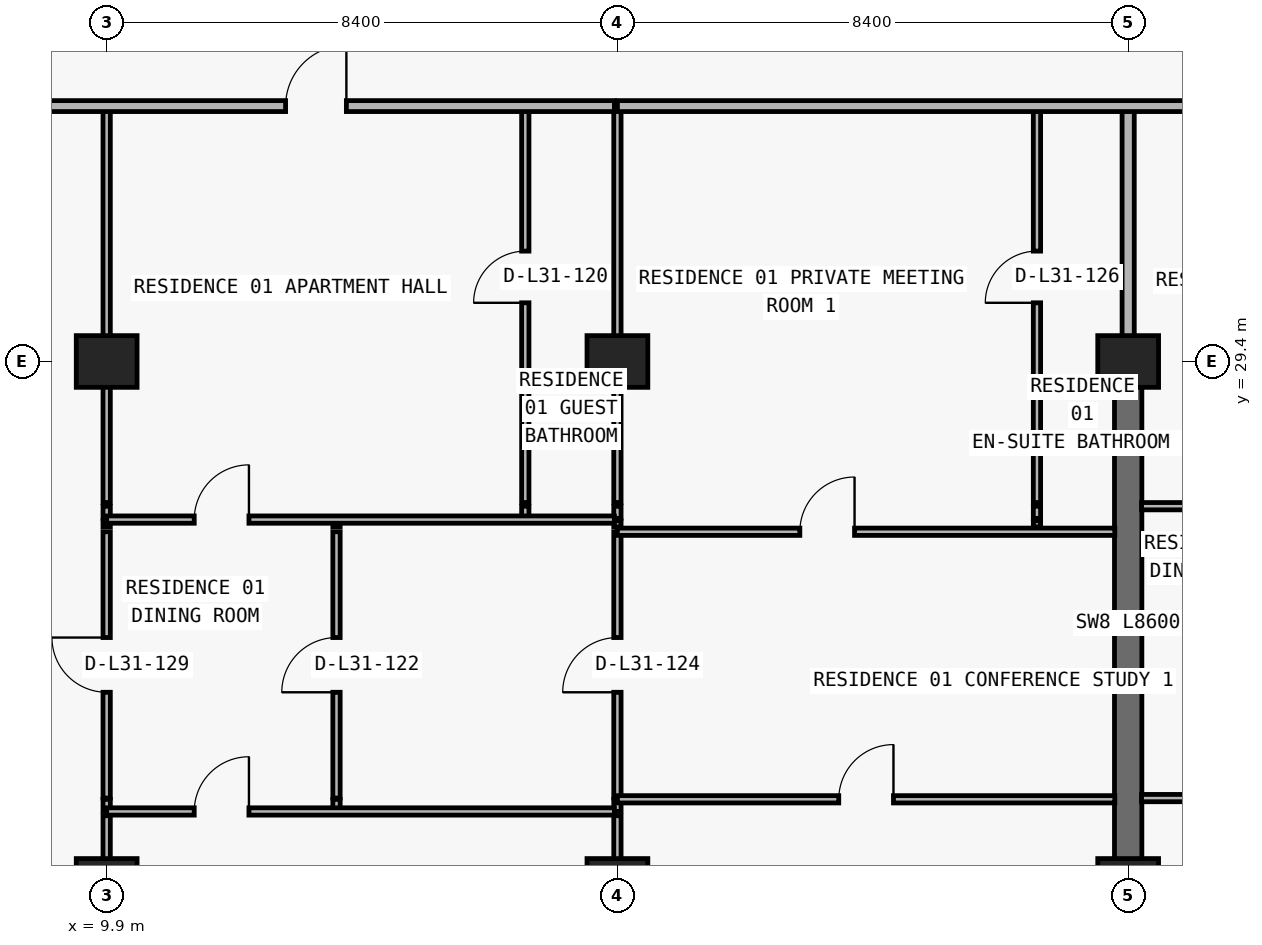
"""IFC4 building model, lengths in metres.
Left out: names, types, materials, properties, quantities, classifications, styles, units other than length and angle.
Written with IfcOpenShell. Run it as: python <this file> out.ifc"""

import sys

from ifc_helpers import new_model, si_unit, direction, frame, frame_2d, origin, origin_2d, place, context, subcontext, project, spatial, rectangle, extrude, element, fill, save


model = new_model("IFC4")
c1 = context("Model", 3, precision=1e-05, world=origin(), true_north=direction((0.0, 1.0)))
c2 = subcontext(c1, "Body", "Model", "MODEL_VIEW")
j1 = project(units=[si_unit("LENGTHUNIT", "METRE"), si_unit("PLANEANGLEUNIT", "RADIAN")], contexts=[c1])
p1 = place(None, origin())
s1 = spatial("IfcSite", under=j1, at=p1, CompositionType="ELEMENT")
p2 = place(p1, origin())
s2 = spatial("IfcBuilding", under=s1, at=p2, CompositionType="ELEMENT")
p3 = place(p2, frame((0.0, 0.0, 115.8)))
s3 = spatial("IfcBuildingStorey", under=s2, at=p3, CompositionType="ELEMENT", Elevation=115.8)
for number, where, z_axis, x_axis in (
    (1, (9.9, 20.8, 0.0), (0.0, 0.0, 1.0), (1.0, 0.0, 0.0)),
    (2, (18.3, 20.8, 0.0), (0.0, 0.0, 1.0), (1.0, 0.0, 0.0)),
    (3, (26.7, 20.8, 0.0), (0.0, 0.0, 1.0), (1.0, 0.0, 0.0)),
    (4, (9.9, 29.4, 0.0), (0.0, 0.0, 1.0), (1.0, 0.0, 0.0)),
    (5, (18.3, 29.4, 0.0), (0.0, 0.0, 1.0), (1.0, 0.0, 0.0)),
    (6, (26.7, 29.4, 0.0), (0.0, 0.0, 1.0), (1.0, 0.0, 0.0)),
):
    element("IfcColumn", number, at=place(p3, frame(where, z_axis=z_axis, x_axis=x_axis)), inside=s3, PredefinedType="COLUMN", context=c2, shape_type="SweptSolid", body=[
        extrude(rectangle(XDim=1.0, YDim=0.85, at=origin_2d()), origin(), (0.0, 0.0, 1.0), 3.05),
    ])
p4 = place(p3, frame((26.7, 20.8, 0.0), z_axis=(0.0, 0.0, 1.0), x_axis=(0.0, 1.0, 0.0)))
e7 = element("IfcWall", 7, at=p4, inside=s3, PredefinedType="SHEAR", context=c2, shape_type="SweptSolid", body=[
    extrude(rectangle(XDim=8.6, YDim=0.45, at=frame_2d((4.3, 0.0))), origin(), (0.0, 0.0, 1.0), 3.05),
])
p5 = place(p3, frame((9.9, 8.84, 0.0), z_axis=(0.0, 0.0, 1.0), x_axis=(0.0, 1.0, 0.0)))
e8 = element("IfcWall", 8, at=p5, inside=s3, PredefinedType="PARTITIONING", context=c2, shape_type="SweptSolid", body=[
    extrude(rectangle(XDim=13.09, YDim=0.12, at=frame_2d((6.545, 0.0))), origin(), (0.0, 0.0, 1.0), 2.174),
])
p6 = place(p3, frame((9.9, 22.0, 0.0), z_axis=(0.0, 0.0, 1.0), x_axis=(0.0, 1.0, 0.0)))
e9 = element("IfcWall", 9, at=p6, inside=s3, PredefinedType="PARTITIONING", context=c2, shape_type="SweptSolid", body=[
    extrude(rectangle(XDim=0.2, YDim=0.12, at=frame_2d((0.1, 0.0))), origin(), (0.0, 0.0, 1.0), 2.174),
])
p7 = place(p3, frame((9.9, 22.22, 0.0), z_axis=(0.0, 0.0, 1.0), x_axis=(0.0, 1.0, 0.0)))
e10 = element("IfcWall", 10, at=p7, inside=s3, PredefinedType="PARTITIONING", context=c2, shape_type="SweptSolid", body=[
    extrude(rectangle(XDim=4.38, YDim=0.12, at=frame_2d((2.19, 0.0))), origin(), (0.0, 0.0, 1.0), 2.174),
])
p8 = place(p7, frame((1.74, 0.0, 0.0)))
e11 = element("IfcOpeningElement", 11, at=p8, cuts=e10, PredefinedType="OPENING", context=c2, shape_type="SweptSolid", body=[
    extrude(rectangle(XDim=0.9, YDim=2.124, at=frame_2d((0.45, 1.062))), frame((0.0, 0.07, 0.0), z_axis=(0.0, -1.0, 0.0), x_axis=(1.0, 0.0, 0.0)), (0.0, 0.0, 1.0), 0.14),
])
p9 = place(p3, frame((9.9, 26.68, 0.0), z_axis=(0.0, 0.0, 1.0), x_axis=(0.0, 1.0, 0.0)))
e12 = element("IfcWall", 12, at=p9, inside=s3, PredefinedType="PARTITIONING", context=c2, shape_type="SweptSolid", body=[
    extrude(rectangle(XDim=0.1, YDim=0.12, at=frame_2d((0.05, 0.0))), origin(), (0.0, 0.0, 1.0), 2.174),
])
p10 = place(p3, frame((9.9, 26.82, 0.0), z_axis=(0.0, 0.0, 1.0), x_axis=(0.0, 1.0, 0.0)))
e13 = element("IfcWall", 13, at=p10, inside=s3, PredefinedType="PARTITIONING", context=c2, shape_type="SweptSolid", body=[
    extrude(rectangle(XDim=0.2, YDim=0.12, at=frame_2d((0.1, 0.0))), origin(), (0.0, 0.0, 1.0), 2.174),
])
p11 = place(p3, frame((9.9, 27.08, 0.0), z_axis=(0.0, 0.0, 1.0), x_axis=(0.0, 1.0, 0.0)))
e14 = element("IfcWall", 14, at=p11, inside=s3, PredefinedType="PARTITIONING", context=c2, shape_type="SweptSolid", body=[
    extrude(rectangle(XDim=6.52, YDim=0.12, at=frame_2d((3.26, 0.0))), origin(), (0.0, 0.0, 1.0), 2.174),
])
p12 = place(p3, frame((13.68, 22.0, 0.0), z_axis=(0.0, 0.0, 1.0), x_axis=(0.0, 1.0, 0.0)))
e15 = element("IfcWall", 15, at=p12, inside=s3, PredefinedType="PARTITIONING", context=c2, shape_type="SweptSolid", body=[
    extrude(rectangle(XDim=0.2, YDim=0.12, at=frame_2d((0.1, 0.0))), origin(), (0.0, 0.0, 1.0), 3.05),
])
p13 = place(p3, frame((13.68, 22.22, 0.0), z_axis=(0.0, 0.0, 1.0), x_axis=(0.0, 1.0, 0.0)))
e16 = element("IfcWall", 16, at=p13, inside=s3, PredefinedType="PARTITIONING", context=c2, shape_type="SweptSolid", body=[
    extrude(rectangle(XDim=4.38, YDim=0.12, at=frame_2d((2.19, 0.0))), origin(), (0.0, 0.0, 1.0), 3.05),
])
p14 = place(p13, frame((1.74, 0.0, 0.0)))
e17 = element("IfcOpeningElement", 17, at=p14, cuts=e16, PredefinedType="OPENING", context=c2, shape_type="SweptSolid", body=[
    extrude(rectangle(XDim=0.9, YDim=2.15, at=frame_2d((0.45, 1.075))), frame((0.0, 0.07, 0.0), z_axis=(0.0, -1.0, 0.0), x_axis=(1.0, 0.0, 0.0)), (0.0, 0.0, 1.0), 0.14),
])
p15 = place(p3, frame((13.68, 26.68, 0.0), z_axis=(0.0, 0.0, 1.0), x_axis=(0.0, 1.0, 0.0)))
e18 = element("IfcWall", 18, at=p15, inside=s3, PredefinedType="PARTITIONING", context=c2, shape_type="SweptSolid", body=[
    extrude(rectangle(XDim=0.1, YDim=0.12, at=frame_2d((0.05, 0.0))), origin(), (0.0, 0.0, 1.0), 3.05),
])
p16 = place(p3, frame((16.785, 26.82, 0.0), z_axis=(0.0, 0.0, 1.0), x_axis=(0.0, 1.0, 0.0)))
e19 = element("IfcWall", 19, at=p16, inside=s3, PredefinedType="PARTITIONING", context=c2, shape_type="SweptSolid", body=[
    extrude(rectangle(XDim=0.2, YDim=0.12, at=frame_2d((0.1, 0.0))), origin(), (0.0, 0.0, 1.0), 3.05),
])
p17 = place(p3, frame((16.785, 27.08, 0.0), z_axis=(0.0, 0.0, 1.0), x_axis=(0.0, 1.0, 0.0)))
e20 = element("IfcWall", 20, at=p17, inside=s3, PredefinedType="PARTITIONING", context=c2, shape_type="SweptSolid", body=[
    extrude(rectangle(XDim=6.52, YDim=0.12, at=frame_2d((3.26, 0.0))), origin(), (0.0, 0.0, 1.0), 3.05),
])
p18 = place(p17, frame((3.285, 0.0, 0.0)))
e21 = element("IfcOpeningElement", 21, at=p18, cuts=e20, PredefinedType="OPENING", context=c2, shape_type="SweptSolid", body=[
    extrude(rectangle(XDim=0.85, YDim=2.1, at=frame_2d((0.425, 1.05))), frame((0.0, 0.07, 0.0), z_axis=(0.0, -1.0, 0.0), x_axis=(1.0, 0.0, 0.0)), (0.0, 0.0, 1.0), 0.14),
])
p19 = place(p3, frame((18.3, 8.84, 0.0), z_axis=(0.0, 0.0, 1.0), x_axis=(0.0, 1.0, 0.0)))
e22 = element("IfcWall", 22, at=p19, inside=s3, PredefinedType="PARTITIONING", context=c2, shape_type="SweptSolid", body=[
    extrude(rectangle(XDim=13.09, YDim=0.12, at=frame_2d((6.545, 0.0))), origin(), (0.0, 0.0, 1.0), 2.174),
])
p20 = place(p3, frame((18.3, 22.0, 0.0), z_axis=(0.0, 0.0, 1.0), x_axis=(0.0, 1.0, 0.0)))
e23 = element("IfcWall", 23, at=p20, inside=s3, PredefinedType="PARTITIONING", context=c2, shape_type="SweptSolid", body=[
    extrude(rectangle(XDim=0.2, YDim=0.12, at=frame_2d((0.1, 0.0))), origin(), (0.0, 0.0, 1.0), 2.174),
])
p21 = place(p3, frame((18.3, 22.22, 0.0), z_axis=(0.0, 0.0, 1.0), x_axis=(0.0, 1.0, 0.0)))
e24 = element("IfcWall", 24, at=p21, inside=s3, PredefinedType="PARTITIONING", context=c2, shape_type="SweptSolid", body=[
    extrude(rectangle(XDim=4.38, YDim=0.12, at=frame_2d((2.19, 0.0))), origin(), (0.0, 0.0, 1.0), 2.174),
])
p22 = place(p21, frame((1.74, 0.0, 0.0)))
e25 = element("IfcOpeningElement", 25, at=p22, cuts=e24, PredefinedType="OPENING", context=c2, shape_type="SweptSolid", body=[
    extrude(rectangle(XDim=0.9, YDim=2.124, at=frame_2d((0.45, 1.062))), frame((0.0, 0.07, 0.0), z_axis=(0.0, -1.0, 0.0), x_axis=(1.0, 0.0, 0.0)), (0.0, 0.0, 1.0), 0.14),
])
p23 = place(p3, frame((18.3, 26.68, 0.0), z_axis=(0.0, 0.0, 1.0), x_axis=(0.0, 1.0, 0.0)))
e26 = element("IfcWall", 26, at=p23, inside=s3, PredefinedType="PARTITIONING", context=c2, shape_type="SweptSolid", body=[
    extrude(rectangle(XDim=0.1, YDim=0.12, at=frame_2d((0.05, 0.0))), origin(), (0.0, 0.0, 1.0), 2.174),
])
p24 = place(p3, frame((18.3, 26.82, 0.0), z_axis=(0.0, 0.0, 1.0), x_axis=(0.0, 1.0, 0.0)))
e27 = element("IfcWall", 27, at=p24, inside=s3, PredefinedType="PARTITIONING", context=c2, shape_type="SweptSolid", body=[
    extrude(rectangle(XDim=0.2, YDim=0.12, at=frame_2d((0.1, 0.0))), origin(), (0.0, 0.0, 1.0), 2.174),
])
p25 = place(p3, frame((18.3, 27.08, 0.0), z_axis=(0.0, 0.0, 1.0), x_axis=(0.0, 1.0, 0.0)))
e28 = element("IfcWall", 28, at=p25, inside=s3, PredefinedType="PARTITIONING", context=c2, shape_type="SweptSolid", body=[
    extrude(rectangle(XDim=6.52, YDim=0.12, at=frame_2d((3.26, 0.0))), origin(), (0.0, 0.0, 1.0), 2.174),
])
p26 = place(p3, frame((25.2, 26.68, 0.0), z_axis=(0.0, 0.0, 1.0), x_axis=(0.0, 1.0, 0.0)))
e29 = element("IfcWall", 29, at=p26, inside=s3, PredefinedType="PARTITIONING", context=c2, shape_type="SweptSolid", body=[
    extrude(rectangle(XDim=0.1, YDim=0.12, at=frame_2d((0.05, 0.0))), origin(), (0.0, 0.0, 1.0), 3.05),
])
p27 = place(p3, frame((25.2, 26.82, 0.0), z_axis=(0.0, 0.0, 1.0), x_axis=(0.0, 1.0, 0.0)))
e30 = element("IfcWall", 30, at=p27, inside=s3, PredefinedType="PARTITIONING", context=c2, shape_type="SweptSolid", body=[
    extrude(rectangle(XDim=0.2, YDim=0.12, at=frame_2d((0.1, 0.0))), origin(), (0.0, 0.0, 1.0), 3.05),
])
p28 = place(p3, frame((25.2, 27.08, 0.0), z_axis=(0.0, 0.0, 1.0), x_axis=(0.0, 1.0, 0.0)))
e31 = element("IfcWall", 31, at=p28, inside=s3, PredefinedType="PARTITIONING", context=c2, shape_type="SweptSolid", body=[
    extrude(rectangle(XDim=6.52, YDim=0.12, at=frame_2d((3.26, 0.0))), origin(), (0.0, 0.0, 1.0), 3.05),
])
p29 = place(p28, frame((3.285, 0.0, 0.0)))
e32 = element("IfcOpeningElement", 32, at=p29, cuts=e31, PredefinedType="OPENING", context=c2, shape_type="SweptSolid", body=[
    extrude(rectangle(XDim=0.85, YDim=2.1, at=frame_2d((0.425, 1.05))), frame((0.0, 0.07, 0.0), z_axis=(0.0, -1.0, 0.0), x_axis=(1.0, 0.0, 0.0)), (0.0, 0.0, 1.0), 0.14),
])
p30 = place(p3, frame((26.7, 29.405, 0.0), z_axis=(0.0, 0.0, 1.0), x_axis=(0.0, 1.0, 0.0)))
e33 = element("IfcWall", 33, at=p30, inside=s3, PredefinedType="PARTITIONING", context=c2, shape_type="SweptSolid", body=[
    extrude(rectangle(XDim=4.195, YDim=0.2, at=frame_2d((2.098, 0.0))), origin(), (0.0, 0.0, 1.0), 2.335),
])
p31 = place(p3, frame((9.9, 22.0, 0.0), z_axis=(0.0, 0.0, 1.0), x_axis=(1.0, 0.0, 0.0)))
e34 = element("IfcWall", 34, at=p31, inside=s3, PredefinedType="PARTITIONING", context=c2, shape_type="SweptSolid", body=[
    extrude(rectangle(XDim=8.35, YDim=0.12, at=frame_2d((4.175, 0.0))), origin(), (0.0, 0.0, 1.0), 3.05),
])
p32 = place(p31, frame((1.44, 0.0, 0.0)))
e35 = element("IfcOpeningElement", 35, at=p32, cuts=e34, PredefinedType="OPENING", context=c2, shape_type="SweptSolid", body=[
    extrude(rectangle(XDim=0.9, YDim=2.15, at=frame_2d((0.45, 1.075))), frame((0.0, 0.07, 0.0), z_axis=(0.0, -1.0, 0.0), x_axis=(1.0, 0.0, 0.0)), (0.0, 0.0, 1.0), 0.14),
])
p33 = place(p3, frame((18.3, 22.2, 0.0), z_axis=(0.0, 0.0, 1.0), x_axis=(1.0, 0.0, 0.0)))
e36 = element("IfcWall", 36, at=p33, inside=s3, PredefinedType="PARTITIONING", context=c2, shape_type="SweptSolid", body=[
    extrude(rectangle(XDim=8.18, YDim=0.12, at=frame_2d((4.09, 0.0))), origin(), (0.0, 0.0, 1.0), 3.05),
])
p34 = place(p33, frame((3.64, 0.0, 0.0)))
e37 = element("IfcOpeningElement", 37, at=p34, cuts=e36, PredefinedType="OPENING", context=c2, shape_type="SweptSolid", body=[
    extrude(rectangle(XDim=0.9, YDim=2.15, at=frame_2d((0.45, 1.075))), frame((0.0, 0.07, 0.0), z_axis=(0.0, -1.0, 0.0), x_axis=(1.0, 0.0, 0.0)), (0.0, 0.0, 1.0), 0.14),
])
p35 = place(p3, frame((26.92, 22.22, 0.0), z_axis=(0.0, 0.0, 1.0), x_axis=(1.0, 0.0, 0.0)))
e38 = element("IfcWall", 38, at=p35, inside=s3, PredefinedType="PARTITIONING", context=c2, shape_type="SweptSolid", body=[
    extrude(rectangle(XDim=8.18, YDim=0.12, at=frame_2d((4.09, 0.0))), origin(), (0.0, 0.0, 1.0), 3.05),
])
p36 = place(p35, frame((1.204, 0.0, 0.0)))
e39 = element("IfcOpeningElement", 39, at=p36, cuts=e38, PredefinedType="OPENING", context=c2, shape_type="SweptSolid", body=[
    extrude(rectangle(XDim=0.9, YDim=2.15, at=frame_2d((0.45, 1.075))), frame((0.0, 0.07, 0.0), z_axis=(0.0, -1.0, 0.0), x_axis=(1.0, 0.0, 0.0)), (0.0, 0.0, 1.0), 0.14),
])
p37 = place(p3, frame((18.3, 26.6, 0.0), z_axis=(0.0, 0.0, 1.0), x_axis=(1.0, 0.0, 0.0)))
e40 = element("IfcWall", 40, at=p37, inside=s3, PredefinedType="PARTITIONING", context=c2, shape_type="SweptSolid", body=[
    extrude(rectangle(XDim=8.18, YDim=0.12, at=frame_2d((4.09, 0.0))), origin(), (0.0, 0.0, 1.0), 3.05),
])
p38 = place(p37, frame((3.0, 0.0, 0.0)))
e41 = element("IfcOpeningElement", 41, at=p38, cuts=e40, PredefinedType="OPENING", context=c2, shape_type="SweptSolid", body=[
    extrude(rectangle(XDim=0.9, YDim=2.15, at=frame_2d((0.45, 1.075))), frame((0.0, 0.07, 0.0), z_axis=(0.0, -1.0, 0.0), x_axis=(1.0, 0.0, 0.0)), (0.0, 0.0, 1.0), 0.14),
])
p39 = place(p3, frame((9.9, 26.8, 0.0), z_axis=(0.0, 0.0, 1.0), x_axis=(1.0, 0.0, 0.0)))
e42 = element("IfcWall", 42, at=p39, inside=s3, PredefinedType="PARTITIONING", context=c2, shape_type="SweptSolid", body=[
    extrude(rectangle(XDim=8.35, YDim=0.12, at=frame_2d((4.175, 0.0))), origin(), (0.0, 0.0, 1.0), 3.05),
])
p40 = place(p39, frame((1.44, 0.0, 0.0)))
e43 = element("IfcOpeningElement", 43, at=p40, cuts=e42, PredefinedType="OPENING", context=c2, shape_type="SweptSolid", body=[
    extrude(rectangle(XDim=0.9, YDim=2.15, at=frame_2d((0.45, 1.075))), frame((0.0, 0.07, 0.0), z_axis=(0.0, -1.0, 0.0), x_axis=(1.0, 0.0, 0.0)), (0.0, 0.0, 1.0), 0.14),
])
p41 = place(p3, frame((26.92, 27.02, 0.0), z_axis=(0.0, 0.0, 1.0), x_axis=(1.0, 0.0, 0.0)))
e44 = element("IfcWall", 44, at=p41, inside=s3, PredefinedType="PARTITIONING", context=c2, shape_type="SweptSolid", body=[
    extrude(rectangle(XDim=8.175, YDim=0.12, at=frame_2d((4.087, 0.0))), origin(), (0.0, 0.0, 1.0), 3.05),
])
p42 = place(p41, frame((1.204, 0.0, 0.0)))
e45 = element("IfcOpeningElement", 45, at=p42, cuts=e44, PredefinedType="OPENING", context=c2, shape_type="SweptSolid", body=[
    extrude(rectangle(XDim=0.9, YDim=2.15, at=frame_2d((0.45, 1.075))), frame((0.0, 0.07, 0.0), z_axis=(0.0, -1.0, 0.0), x_axis=(1.0, 0.0, 0.0)), (0.0, 0.0, 1.0), 0.14),
])
p43 = place(p3, frame((7.705, 33.6, 0.0), z_axis=(0.0, 0.0, 1.0), x_axis=(1.0, 0.0, 0.0)))
e46 = element("IfcWall", 46, at=p43, inside=s3, PredefinedType="PARTITIONING", context=c2, shape_type="SweptSolid", body=[
    extrude(rectangle(XDim=10.545, YDim=0.18, at=frame_2d((5.272, 0.0))), origin(), (0.0, 0.0, 1.0), 3.05),
])
p44 = place(p43, frame((5.137, 0.0, 0.0)))
e47 = element("IfcOpeningElement", 47, at=p44, cuts=e46, PredefinedType="OPENING", context=c2, shape_type="SweptSolid", body=[
    extrude(rectangle(XDim=1.0, YDim=2.2, at=frame_2d((0.5, 1.1))), frame((0.0, 0.1, 0.0), z_axis=(0.0, -1.0, 0.0), x_axis=(1.0, 0.0, 0.0)), (0.0, 0.0, 1.0), 0.2),
])
p45 = place(p3, frame((18.3, 33.6, 0.0), z_axis=(0.0, 0.0, 1.0), x_axis=(1.0, 0.0, 0.0)))
e48 = element("IfcWall", 48, at=p45, inside=s3, PredefinedType="PARTITIONING", context=c2, shape_type="SweptSolid", body=[
    extrude(rectangle(XDim=41.2, YDim=0.18, at=frame_2d((20.6, 0.0))), origin(), (0.0, 0.0, 1.0), 3.05),
])
p46 = place(p45, frame((11.35, 0.0, 0.0)))
e49 = element("IfcOpeningElement", 49, at=p46, cuts=e48, PredefinedType="OPENING", context=c2, shape_type="SweptSolid", body=[
    extrude(rectangle(XDim=1.0, YDim=2.2, at=frame_2d((0.5, 1.1))), frame((0.0, 0.1, 0.0), z_axis=(0.0, -1.0, 0.0), x_axis=(1.0, 0.0, 0.0)), (0.0, 0.0, 1.0), 0.2),
])
p47 = place(p45, frame((27.275, 0.0, 0.0)))
e50 = element("IfcOpeningElement", 50, at=p47, cuts=e48, PredefinedType="OPENING", context=c2, shape_type="SweptSolid", body=[
    extrude(rectangle(XDim=1.0, YDim=2.2, at=frame_2d((0.5, 1.1))), frame((0.0, 0.1, 0.0), z_axis=(0.0, -1.0, 0.0), x_axis=(1.0, 0.0, 0.0)), (0.0, 0.0, 1.0), 0.2),
])
p48 = place(p45, frame((35.675, 0.0, 0.0)))
e51 = element("IfcOpeningElement", 51, at=p48, cuts=e48, PredefinedType="OPENING", context=c2, shape_type="SweptSolid", body=[
    extrude(rectangle(XDim=1.0, YDim=2.2, at=frame_2d((0.5, 1.1))), frame((0.0, 0.1, 0.0), z_axis=(0.0, -1.0, 0.0), x_axis=(1.0, 0.0, 0.0)), (0.0, 0.0, 1.0), 0.2),
])
p49 = place(p44, origin())
e52 = element("IfcDoor", 52, at=p49, inside=s3, OperationType="SINGLE_SWING_RIGHT", PredefinedType="DOOR", context=c2, shape_type="SweptSolid", body=[
    extrude(rectangle(XDim=1.0, YDim=2.2, at=frame_2d((0.5, 1.1))), frame((0.0, 0.025, 0.0), z_axis=(0.0, -1.0, 0.0), x_axis=(1.0, 0.0, 0.0)), (0.0, 0.0, 1.0), 0.05),
])
fill(e47, e52)
p50 = place(p18, origin())
e53 = element("IfcDoor", 53, at=p50, inside=s3, OperationType="SINGLE_SWING_LEFT", PredefinedType="DOOR", context=c2, shape_type="SweptSolid", body=[
    extrude(rectangle(XDim=0.85, YDim=2.1, at=frame_2d((0.425, 1.05))), frame((0.0, 0.025, 0.0), z_axis=(0.0, -1.0, 0.0), x_axis=(1.0, 0.0, 0.0)), (0.0, 0.0, 1.0), 0.05),
])
fill(e21, e53)
p51 = place(p40, origin())
e54 = element("IfcDoor", 54, at=p51, inside=s3, OperationType="SINGLE_SWING_RIGHT", PredefinedType="DOOR", context=c2, shape_type="SweptSolid", body=[
    extrude(rectangle(XDim=0.9, YDim=2.15, at=frame_2d((0.45, 1.075))), frame((0.0, 0.025, 0.0), z_axis=(0.0, -1.0, 0.0), x_axis=(1.0, 0.0, 0.0)), (0.0, 0.0, 1.0), 0.05),
])
fill(e43, e54)
p52 = place(p14, origin())
e55 = element("IfcDoor", 55, at=p52, inside=s3, OperationType="SINGLE_SWING_LEFT", PredefinedType="DOOR", context=c2, shape_type="SweptSolid", body=[
    extrude(rectangle(XDim=0.9, YDim=2.15, at=frame_2d((0.45, 1.075))), frame((0.0, 0.025, 0.0), z_axis=(0.0, -1.0, 0.0), x_axis=(1.0, 0.0, 0.0)), (0.0, 0.0, 1.0), 0.05),
])
fill(e17, e55)
p53 = place(p32, origin())
e56 = element("IfcDoor", 56, at=p53, inside=s3, OperationType="SINGLE_SWING_RIGHT", PredefinedType="DOOR", context=c2, shape_type="SweptSolid", body=[
    extrude(rectangle(XDim=0.9, YDim=2.15, at=frame_2d((0.45, 1.075))), frame((0.0, 0.025, 0.0), z_axis=(0.0, -1.0, 0.0), x_axis=(1.0, 0.0, 0.0)), (0.0, 0.0, 1.0), 0.05),
])
fill(e35, e56)
p54 = place(p22, origin())
e57 = element("IfcDoor", 57, at=p54, inside=s3, OperationType="SINGLE_SWING_LEFT", PredefinedType="DOOR", context=c2, shape_type="SweptSolid", body=[
    extrude(rectangle(XDim=0.9, YDim=2.124, at=frame_2d((0.45, 1.062))), frame((0.0, 0.025, 0.0), z_axis=(0.0, -1.0, 0.0), x_axis=(1.0, 0.0, 0.0)), (0.0, 0.0, 1.0), 0.05),
])
fill(e25, e57)
p55 = place(p38, origin())
e58 = element("IfcDoor", 58, at=p55, inside=s3, OperationType="SINGLE_SWING_RIGHT", PredefinedType="DOOR", context=c2, shape_type="SweptSolid", body=[
    extrude(rectangle(XDim=0.9, YDim=2.15, at=frame_2d((0.45, 1.075))), frame((0.0, 0.025, 0.0), z_axis=(0.0, -1.0, 0.0), x_axis=(1.0, 0.0, 0.0)), (0.0, 0.0, 1.0), 0.05),
])
fill(e41, e58)
p56 = place(p29, origin())
e59 = element("IfcDoor", 59, at=p56, inside=s3, OperationType="SINGLE_SWING_LEFT", PredefinedType="DOOR", context=c2, shape_type="SweptSolid", body=[
    extrude(rectangle(XDim=0.85, YDim=2.1, at=frame_2d((0.425, 1.05))), frame((0.0, 0.025, 0.0), z_axis=(0.0, -1.0, 0.0), x_axis=(1.0, 0.0, 0.0)), (0.0, 0.0, 1.0), 0.05),
])
fill(e32, e59)
p57 = place(p34, origin())
e60 = element("IfcDoor", 60, at=p57, inside=s3, OperationType="SINGLE_SWING_RIGHT", PredefinedType="DOOR", context=c2, shape_type="SweptSolid", body=[
    extrude(rectangle(XDim=0.9, YDim=2.15, at=frame_2d((0.45, 1.075))), frame((0.0, 0.025, 0.0), z_axis=(0.0, -1.0, 0.0), x_axis=(1.0, 0.0, 0.0)), (0.0, 0.0, 1.0), 0.05),
])
fill(e37, e60)
p58 = place(p8, origin())
e61 = element("IfcDoor", 61, at=p58, inside=s3, OperationType="SINGLE_SWING_RIGHT", PredefinedType="DOOR", context=c2, shape_type="SweptSolid", body=[
    extrude(rectangle(XDim=0.9, YDim=2.124, at=frame_2d((0.45, 1.062))), frame((0.0, 0.025, 0.0), z_axis=(0.0, -1.0, 0.0), x_axis=(1.0, 0.0, 0.0)), (0.0, 0.0, 1.0), 0.05),
])
fill(e11, e61)
save(model, sys.argv[1])
